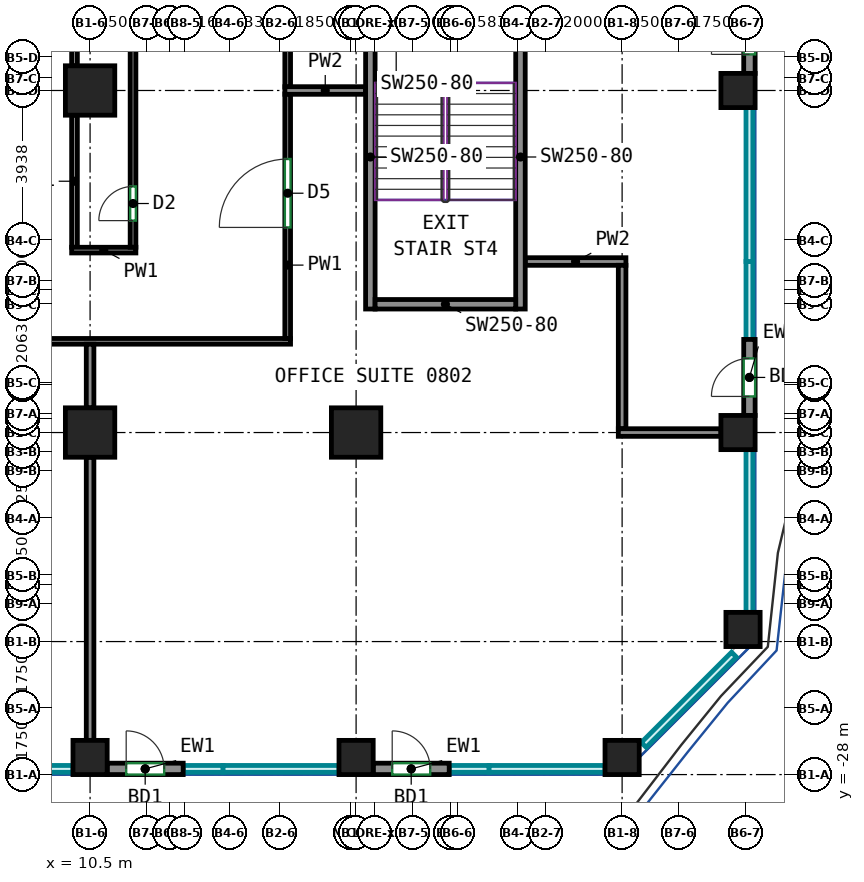
"""IFC4 building model, lengths in metres.
Left out: names, types, materials, properties, quantities, classifications, styles, units other than length and angle.
Written with IfcOpenShell. Run it as: python <this file> out.ifc"""

import sys

from ifc_helpers import new_model, si_unit, direction, frame, frame_2d, origin, origin_2d, place, context, subcontext, project, spatial, rectangle, extrude, source, transform, mapped, element, fill, save


model = new_model("IFC4")
c1 = context("Model", 3, precision=1e-05, world=origin(), true_north=direction((0.0, 1.0)))
c2 = subcontext(c1, "Body", "Model", "MODEL_VIEW")
j1 = project(units=[si_unit("LENGTHUNIT", "METRE"), si_unit("PLANEANGLEUNIT", "RADIAN")], contexts=[c1])
p1 = place(None, origin())
s1 = spatial("IfcSite", under=j1, at=p1, CompositionType="ELEMENT")
p2 = place(p1, origin())
s2 = spatial("IfcBuilding", under=s1, at=p2, CompositionType="ELEMENT")
p3 = place(p2, frame((0.0, 0.0, 39.0)))
s3 = spatial("IfcBuildingStorey", under=s2, at=p3, CompositionType="ELEMENT", Elevation=39.0)
m1 = source(origin(), c2, "Body", "SweptSolid", [
    extrude(rectangle(XDim=0.9, YDim=0.9, at=origin_2d()), origin(), (0.0, 0.0, 1.0), 3.72),
])
p4 = place(p3, frame((10.5, -27.55, 0.0), z_axis=(0.0, 0.0, 1.0), x_axis=(1.0, 0.0, 0.0)))
e1 = element("IfcColumn", 1, at=p4, inside=s3, PredefinedType="COLUMN", context=c2, shape_type="MappedRepresentation", body=[
    mapped(m1, transform((0.0, 0.0, 0.0))),
])
m2 = source(origin(), c2, "Body", "SweptSolid", [
    extrude(rectangle(XDim=1.3, YDim=1.3, at=origin_2d()), origin(), (0.0, 0.0, 1.0), 3.72),
])
for number, where, z_axis, x_axis in (
    (2, (10.5, -19.0, 0.0), (0.0, 0.0, 1.0), (1.0, 0.0, 0.0)),
    (3, (10.5, -10.0, 0.0), (0.0, 0.0, 1.0), (1.0, 0.0, 0.0)),
):
    element("IfcColumn", number, at=place(p3, frame(where, z_axis=z_axis, x_axis=x_axis)), inside=s3, PredefinedType="COLUMN", context=c2, shape_type="MappedRepresentation", body=[
        mapped(m2, transform((0.0, 0.0, 0.0))),
    ])
p5 = place(p3, frame((17.5, -27.55, 0.0), z_axis=(0.0, 0.0, 1.0), x_axis=(1.0, 0.0, 0.0)))
e4 = element("IfcColumn", 4, at=p5, inside=s3, PredefinedType="COLUMN", context=c2, shape_type="MappedRepresentation", body=[
    mapped(m1, transform((0.0, 0.0, 0.0))),
])
p6 = place(p3, frame((17.5, -19.0, 0.0), z_axis=(0.0, 0.0, 1.0), x_axis=(1.0, 0.0, 0.0)))
e5 = element("IfcColumn", 5, at=p6, inside=s3, PredefinedType="COLUMN", context=c2, shape_type="MappedRepresentation", body=[
    mapped(m2, transform((0.0, 0.0, 0.0))),
])
for number, where, z_axis, x_axis in (
    (6, (24.5, -27.55, 0.0), (0.0, 0.0, 1.0), (1.0, 0.0, 0.0)),
    (7, (27.55, -19.0, 0.0), (0.0, 0.0, 1.0), (1.0, 0.0, 0.0)),
    (8, (27.55, -10.0, 0.0), (0.0, 0.0, 1.0), (1.0, 0.0, 0.0)),
    (9, (27.682, -24.182, 0.0), (0.0, 0.0, 1.0), (1.0, 0.0, 0.0)),
):
    element("IfcColumn", number, at=place(p3, frame(where, z_axis=z_axis, x_axis=x_axis)), inside=s3, PredefinedType="COLUMN", context=c2, shape_type="MappedRepresentation", body=[
        mapped(m1, transform((0.0, 0.0, 0.0))),
    ])
m3 = source(origin(), c2, "Body", "SweptSolid", [
    extrude(rectangle(XDim=8.0, YDim=0.25, at=frame_2d((4.0, 0.0))), origin(), (0.0, 0.0, 1.0), 3.72),
])
for number, where, z_axis, x_axis in (
    (10, (17.875, -15.75, 0.0), (0.0, 0.0, 1.0), (0.0, 1.0, 0.0)),
    (11, (21.825, -15.75, 0.0), (0.0, 0.0, 1.0), (0.0, 1.0, 0.0)),
):
    element("IfcWall", number, at=place(p3, frame(where, z_axis=z_axis, x_axis=x_axis)), inside=s3, PredefinedType="SHEAR", context=c2, shape_type="MappedRepresentation", body=[
        mapped(m3, transform((0.0, 0.0, 0.0))),
    ])
m4 = source(origin(), c2, "Body", "SweptSolid", [
    extrude(rectangle(XDim=3.7, YDim=0.25, at=frame_2d((1.85, 0.0))), origin(), (0.0, 0.0, 1.0), 3.72),
])
p7 = place(p3, frame((18.0, -15.625, 0.0), z_axis=(0.0, 0.0, 1.0), x_axis=(1.0, 0.0, 0.0)))
e12 = element("IfcWall", 12, at=p7, inside=s3, PredefinedType="SHEAR", context=c2, shape_type="MappedRepresentation", body=[
    mapped(m4, transform((0.0, 0.0, 0.0))),
])
m5 = source(origin(), c2, "Body", "SweptSolid", [
    extrude(rectangle(XDim=2.0, YDim=0.3, at=frame_2d((1.0, 0.0))), origin(), (0.0, 0.0, 1.0), 3.72),
])
p8 = place(p3, frame((10.95, -27.85, 0.0), z_axis=(0.0, 0.0, 1.0), x_axis=(1.0, 0.0, 0.0)))
e13 = element("IfcWall", 13, at=p8, inside=s3, PredefinedType="SOLIDWALL", context=c2, shape_type="MappedRepresentation", body=[
    mapped(m5, transform((0.0, 0.0, 0.0))),
])
p9 = place(p8, frame((0.5, 0.0, 0.0)))
e14 = element("IfcOpeningElement", 14, at=p9, cuts=e13, PredefinedType="OPENING", context=c2, shape_type="SweptSolid", body=[
    extrude(rectangle(XDim=1.0, YDim=2.1, at=frame_2d((0.5, 1.05))), frame((0.0, 0.16, 0.0), z_axis=(0.0, -1.0, 0.0), x_axis=(1.0, 0.0, 0.0)), (0.0, 0.0, 1.0), 0.32),
])
p10 = place(p3, frame((17.95, -27.85, 0.0), z_axis=(0.0, 0.0, 1.0), x_axis=(1.0, 0.0, 0.0)))
e15 = element("IfcWall", 15, at=p10, inside=s3, PredefinedType="SOLIDWALL", context=c2, shape_type="MappedRepresentation", body=[
    mapped(m5, transform((0.0, 0.0, 0.0))),
])
p11 = place(p10, frame((0.5, 0.0, 0.0)))
e16 = element("IfcOpeningElement", 16, at=p11, cuts=e15, PredefinedType="OPENING", context=c2, shape_type="SweptSolid", body=[
    extrude(rectangle(XDim=1.0, YDim=2.1, at=frame_2d((0.5, 1.05))), frame((0.0, 0.16, 0.0), z_axis=(0.0, -1.0, 0.0), x_axis=(1.0, 0.0, 0.0)), (0.0, 0.0, 1.0), 0.32),
])
p12 = place(p3, frame((27.85, -18.55, 0.0), z_axis=(0.0, 0.0, 1.0), x_axis=(0.0, 1.0, 0.0)))
e17 = element("IfcWall", 17, at=p12, inside=s3, PredefinedType="SOLIDWALL", context=c2, shape_type="MappedRepresentation", body=[
    mapped(m5, transform((0.0, 0.0, 0.0))),
])
p13 = place(p12, frame((0.5, 0.0, 0.0)))
e18 = element("IfcOpeningElement", 18, at=p13, cuts=e17, PredefinedType="OPENING", context=c2, shape_type="SweptSolid", body=[
    extrude(rectangle(XDim=1.0, YDim=2.1, at=frame_2d((0.5, 1.05))), frame((0.0, 0.16, 0.0), z_axis=(0.0, -1.0, 0.0), x_axis=(1.0, 0.0, 0.0)), (0.0, 0.0, 1.0), 0.32),
])
p14 = place(p3, frame((27.85, -9.55, 0.0), z_axis=(0.0, 0.0, 1.0), x_axis=(0.0, 1.0, 0.0)))
e19 = element("IfcWall", 19, at=p14, inside=s3, PredefinedType="SOLIDWALL", context=c2, shape_type="MappedRepresentation", body=[
    mapped(m5, transform((0.0, 0.0, 0.0))),
])
p15 = place(p14, frame((0.5, 0.0, 0.0)))
e20 = element("IfcOpeningElement", 20, at=p15, cuts=e19, PredefinedType="OPENING", context=c2, shape_type="SweptSolid", body=[
    extrude(rectangle(XDim=1.0, YDim=2.1, at=frame_2d((0.5, 1.05))), frame((0.0, 0.16, 0.0), z_axis=(0.0, -1.0, 0.0), x_axis=(1.0, 0.0, 0.0)), (0.0, 0.0, 1.0), 0.32),
])
p16 = place(p3, frame((10.09, -9.35, 0.0), z_axis=(0.0, 0.0, 1.0), x_axis=(0.0, 1.0, 0.0)))
e21 = element("IfcWall", 21, at=p16, inside=s3, PredefinedType="PARTITIONING", context=c2, shape_type="SweptSolid", body=[
    extrude(rectangle(XDim=7.7, YDim=0.15, at=frame_2d((3.85, 0.0))), origin(), (0.0, 0.0, 1.0), 3.72),
])
p17 = place(p3, frame((10.09, -14.125, 0.0), z_axis=(0.0, 0.0, 1.0), x_axis=(0.0, 1.0, 0.0)))
e22 = element("IfcWall", 22, at=p17, inside=s3, PredefinedType="PARTITIONING", context=c2, shape_type="SweptSolid", body=[
    extrude(rectangle(XDim=3.475, YDim=0.15, at=frame_2d((1.738, 0.0))), origin(), (0.0, 0.0, 1.0), 3.72),
])
p18 = place(p3, frame((10.015, -14.2, 0.0), z_axis=(0.0, 0.0, 1.0), x_axis=(1.0, 0.0, 0.0)))
e23 = element("IfcWall", 23, at=p18, inside=s3, PredefinedType="PARTITIONING", context=c2, shape_type="SweptSolid", body=[
    extrude(rectangle(XDim=1.69, YDim=0.15, at=frame_2d((0.845, 0.0))), origin(), (0.0, 0.0, 1.0), 3.72),
])
p19 = place(p3, frame((11.63, -14.125, 0.0), z_axis=(0.0, 0.0, 1.0), x_axis=(0.0, 1.0, 0.0)))
e24 = element("IfcWall", 24, at=p19, inside=s3, PredefinedType="PARTITIONING", context=c2, shape_type="SweptSolid", body=[
    extrude(rectangle(XDim=13.035, YDim=0.15, at=frame_2d((6.518, 0.0))), origin(), (0.0, 0.0, 1.0), 3.72),
])
p20 = place(p19, frame((0.701, 0.0, 0.0)))
e25 = element("IfcOpeningElement", 25, at=p20, cuts=e24, PredefinedType="OPENING", context=c2, shape_type="SweptSolid", body=[
    extrude(rectangle(XDim=0.9, YDim=2.1, at=frame_2d((0.45, 1.05))), frame((0.0, 0.085, 0.0), z_axis=(0.0, -1.0, 0.0), x_axis=(1.0, 0.0, 0.0)), (0.0, 0.0, 1.0), 0.17),
])
p21 = place(p3, frame((-10.51, -16.6, 0.0), z_axis=(0.0, 0.0, 1.0), x_axis=(1.0, 0.0, 0.0)))
e26 = element("IfcWall", 26, at=p21, inside=s3, PredefinedType="PARTITIONING", context=c2, shape_type="SweptSolid", body=[
    extrude(rectangle(XDim=26.285, YDim=0.15, at=frame_2d((13.143, 0.0))), origin(), (0.0, 0.0, 1.0), 3.72),
])
p22 = place(p21, frame((16.918, 0.0, 0.0)))
e27 = element("IfcOpeningElement", 27, at=p22, cuts=e26, PredefinedType="OPENING", context=c2, shape_type="SweptSolid", body=[
    extrude(rectangle(XDim=1.8, YDim=2.1, at=frame_2d((0.9, 1.05))), frame((0.0, 0.085, 0.0), z_axis=(0.0, -1.0, 0.0), x_axis=(1.0, 0.0, 0.0)), (0.0, 0.0, 1.0), 0.17),
])
p23 = place(p3, frame((15.7, -16.525, 0.0), z_axis=(0.0, 0.0, 1.0), x_axis=(0.0, 1.0, 0.0)))
e28 = element("IfcWall", 28, at=p23, inside=s3, PredefinedType="PARTITIONING", context=c2, shape_type="SweptSolid", body=[
    extrude(rectangle(XDim=6.435, YDim=0.15, at=frame_2d((3.217, 0.0))), origin(), (0.0, 0.0, 1.0), 3.72),
])
p24 = place(p23, frame((2.922, 0.0, 0.0)))
e29 = element("IfcOpeningElement", 29, at=p24, cuts=e28, PredefinedType="OPENING", context=c2, shape_type="SweptSolid", body=[
    extrude(rectangle(XDim=1.8, YDim=2.1, at=frame_2d((0.9, 1.05))), frame((0.0, 0.085, 0.0), z_axis=(0.0, -1.0, 0.0), x_axis=(1.0, 0.0, 0.0)), (0.0, 0.0, 1.0), 0.17),
])
p25 = place(p3, frame((15.7, -9.91, 0.0), z_axis=(0.0, 0.0, 1.0), x_axis=(0.0, 1.0, 0.0)))
e30 = element("IfcWall", 30, at=p25, inside=s3, PredefinedType="PARTITIONING", context=c2, shape_type="SweptSolid", body=[
    extrude(rectangle(XDim=7.285, YDim=0.15, at=frame_2d((3.643, 0.0))), origin(), (0.0, 0.0, 1.0), 3.72),
])
p26 = place(p25, frame((6.308, 0.0, 0.0)))
e31 = element("IfcOpeningElement", 31, at=p26, cuts=e30, PredefinedType="OPENING", context=c2, shape_type="SweptSolid", body=[
    extrude(rectangle(XDim=0.9, YDim=2.1, at=frame_2d((0.45, 1.05))), frame((0.0, 0.085, 0.0), z_axis=(0.0, -1.0, 0.0), x_axis=(1.0, 0.0, 0.0)), (0.0, 0.0, 1.0), 0.17),
])
p27 = place(p3, frame((10.5, -18.35, 0.0), z_axis=(0.0, 0.0, 1.0), x_axis=(0.0, 1.0, 0.0)))
e32 = element("IfcWall", 32, at=p27, inside=s3, PredefinedType="PARTITIONING", context=c2, shape_type="SweptSolid", body=[
    extrude(rectangle(XDim=1.674, YDim=0.2, at=frame_2d((0.837, 0.0))), origin(), (0.0, 0.0, 1.0), 3.07),
])
p28 = place(p3, frame((10.5, -27.1, 0.0), z_axis=(0.0, 0.0, 1.0), x_axis=(0.0, 1.0, 0.0)))
e33 = element("IfcWall", 33, at=p28, inside=s3, PredefinedType="PARTITIONING", context=c2, shape_type="SweptSolid", body=[
    extrude(rectangle(XDim=7.45, YDim=0.2, at=frame_2d((3.725, 0.0))), origin(), (0.0, 0.0, 1.0), 3.07),
])
p29 = place(p3, frame((17.75, -10.0, 0.0), z_axis=(0.0, 0.0, 1.0), x_axis=(-1.0, 0.0, 0.0)))
e34 = element("IfcWall", 34, at=p29, inside=s3, PredefinedType="PARTITIONING", context=c2, shape_type="SweptSolid", body=[
    extrude(rectangle(XDim=2.124, YDim=0.2, at=frame_2d((1.062, 0.0))), origin(), (0.0, 0.0, 1.0), 3.72),
])
p30 = place(p3, frame((24.6, -14.5, 0.0), z_axis=(0.0, 0.0, 1.0), x_axis=(-1.0, 0.0, 0.0)))
e35 = element("IfcWall", 35, at=p30, inside=s3, PredefinedType="PARTITIONING", context=c2, shape_type="SweptSolid", body=[
    extrude(rectangle(XDim=2.65, YDim=0.2, at=frame_2d((1.325, 0.0))), origin(), (0.0, 0.0, 1.0), 3.72),
])
p31 = place(p3, frame((24.5, -18.9, 0.0), z_axis=(0.0, 0.0, 1.0), x_axis=(0.0, 1.0, 0.0)))
e36 = element("IfcWall", 36, at=p31, inside=s3, PredefinedType="PARTITIONING", context=c2, shape_type="SweptSolid", body=[
    extrude(rectangle(XDim=4.3, YDim=0.2, at=frame_2d((2.15, 0.0))), origin(), (0.0, 0.0, 1.0), 3.07),
])
p32 = place(p3, frame((27.1, -19.0, 0.0), z_axis=(0.0, 0.0, 1.0), x_axis=(-1.0, 0.0, 0.0)))
e37 = element("IfcWall", 37, at=p32, inside=s3, PredefinedType="PARTITIONING", context=c2, shape_type="SweptSolid", body=[
    extrude(rectangle(XDim=2.7, YDim=0.2, at=frame_2d((1.35, 0.0))), origin(), (0.0, 0.0, 1.0), 3.07),
])
p33 = place(p9, origin())
e38 = element("IfcDoor", 38, at=p33, inside=s3, OperationType="SINGLE_SWING_LEFT", PredefinedType="DOOR", context=c2, shape_type="SweptSolid", body=[
    extrude(rectangle(XDim=1.0, YDim=2.1, at=frame_2d((0.5, 1.05))), frame((0.0, 0.025, 0.0), z_axis=(0.0, -1.0, 0.0), x_axis=(1.0, 0.0, 0.0)), (0.0, 0.0, 1.0), 0.05),
])
fill(e14, e38)
p34 = place(p11, origin())
e39 = element("IfcDoor", 39, at=p34, inside=s3, OperationType="SINGLE_SWING_LEFT", PredefinedType="DOOR", context=c2, shape_type="SweptSolid", body=[
    extrude(rectangle(XDim=1.0, YDim=2.1, at=frame_2d((0.5, 1.05))), frame((0.0, 0.025, 0.0), z_axis=(0.0, -1.0, 0.0), x_axis=(1.0, 0.0, 0.0)), (0.0, 0.0, 1.0), 0.05),
])
fill(e16, e39)
p35 = place(p13, origin())
e40 = element("IfcDoor", 40, at=p35, inside=s3, OperationType="SINGLE_SWING_LEFT", PredefinedType="DOOR", context=c2, shape_type="SweptSolid", body=[
    extrude(rectangle(XDim=1.0, YDim=2.1, at=frame_2d((0.5, 1.05))), frame((0.0, 0.025, 0.0), z_axis=(0.0, -1.0, 0.0), x_axis=(1.0, 0.0, 0.0)), (0.0, 0.0, 1.0), 0.05),
])
fill(e18, e40)
p36 = place(p15, origin())
e41 = element("IfcDoor", 41, at=p36, inside=s3, OperationType="SINGLE_SWING_LEFT", PredefinedType="DOOR", context=c2, shape_type="SweptSolid", body=[
    extrude(rectangle(XDim=1.0, YDim=2.1, at=frame_2d((0.5, 1.05))), frame((0.0, 0.025, 0.0), z_axis=(0.0, -1.0, 0.0), x_axis=(1.0, 0.0, 0.0)), (0.0, 0.0, 1.0), 0.05),
])
fill(e20, e41)
p37 = place(p20, origin())
e42 = element("IfcDoor", 42, at=p37, inside=s3, OperationType="SINGLE_SWING_LEFT", PredefinedType="DOOR", context=c2, shape_type="SweptSolid", body=[
    extrude(rectangle(XDim=0.9, YDim=2.1, at=frame_2d((0.45, 1.05))), frame((0.0, 0.025, 0.0), z_axis=(0.0, -1.0, 0.0), x_axis=(1.0, 0.0, 0.0)), (0.0, 0.0, 1.0), 0.05),
])
fill(e25, e42)
p38 = place(p24, origin())
e43 = element("IfcDoor", 43, at=p38, inside=s3, OperationType="DOUBLE_DOOR_SINGLE_SWING", PredefinedType="DOOR", context=c2, shape_type="SweptSolid", body=[
    extrude(rectangle(XDim=1.8, YDim=2.1, at=frame_2d((0.9, 1.05))), frame((0.0, 0.025, 0.0), z_axis=(0.0, -1.0, 0.0), x_axis=(1.0, 0.0, 0.0)), (0.0, 0.0, 1.0), 0.05),
])
fill(e29, e43)
save(model, sys.argv[1])
